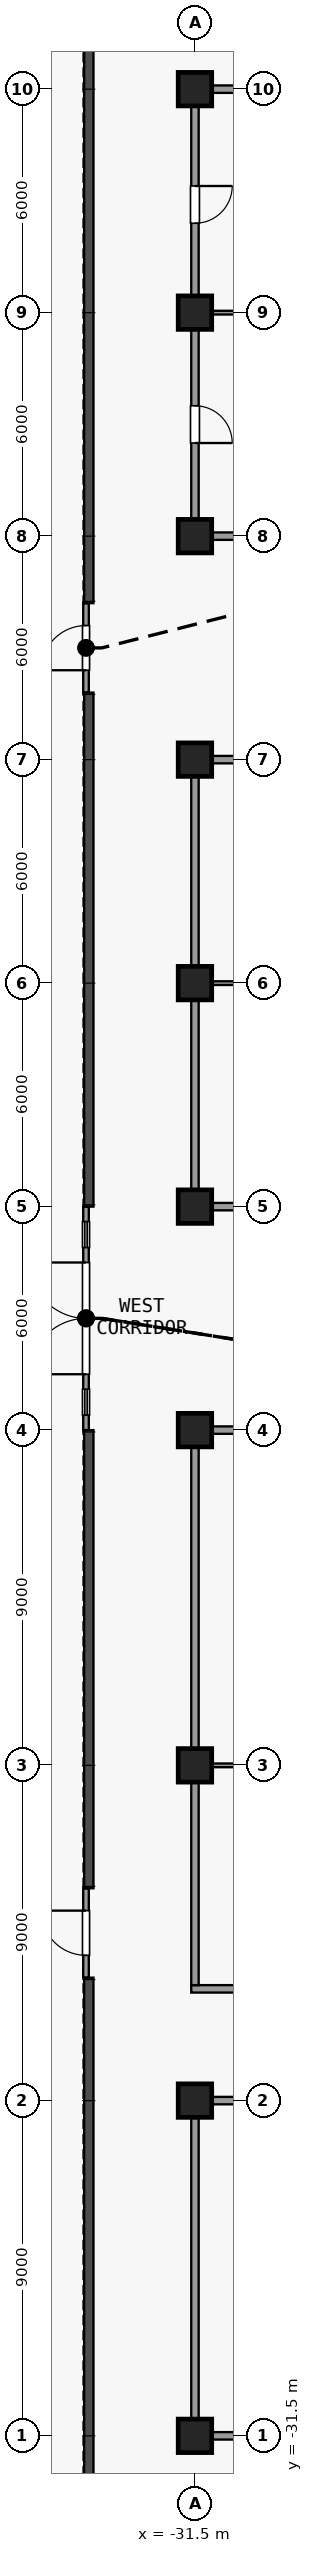
"""IFC4 building model, lengths in metres.
Left out: names, types, materials, properties, quantities, classifications, styles, units other than length and angle.
Written with IfcOpenShell. Run it as: python <this file> out.ifc"""

import sys

from ifc_helpers import new_model, si_unit, direction, frame, frame_2d, origin, origin_2d, place, context, subcontext, project, spatial, rectangle, extrude, element, fill, save


model = new_model("IFC4")
c1 = context("Model", 3, precision=1e-05, world=origin(), true_north=direction((0.0, 1.0)))
c2 = subcontext(c1, "Body", "Model", "MODEL_VIEW")
j1 = project(units=[si_unit("LENGTHUNIT", "METRE"), si_unit("PLANEANGLEUNIT", "RADIAN")], contexts=[c1])
p1 = place(None, origin())
s1 = spatial("IfcSite", under=j1, at=p1, CompositionType="ELEMENT")
p2 = place(p1, origin())
s2 = spatial("IfcBuilding", under=s1, at=p2, CompositionType="ELEMENT")
p3 = place(p2, origin())
s3 = spatial("IfcBuildingStorey", under=s2, at=p3, CompositionType="ELEMENT", Elevation=0.0)
for number, where, z_axis, x_axis in (
    (1, (-31.5, -31.5, 0.0), (0.0, 0.0, 1.0), (1.0, 0.0, 0.0)),
    (2, (-31.5, -22.5, 0.0), (0.0, 0.0, 1.0), (1.0, 0.0, 0.0)),
    (3, (-31.5, -13.5, 0.0), (0.0, 0.0, 1.0), (1.0, 0.0, 0.0)),
    (4, (-31.5, -4.5, 0.0), (0.0, 0.0, 1.0), (1.0, 0.0, 0.0)),
    (5, (-31.5, 1.5, 0.0), (0.0, 0.0, 1.0), (1.0, 0.0, 0.0)),
    (6, (-31.5, 7.5, 0.0), (0.0, 0.0, 1.0), (1.0, 0.0, 0.0)),
    (7, (-31.5, 13.5, 0.0), (0.0, 0.0, 1.0), (1.0, 0.0, 0.0)),
    (8, (-31.5, 19.5, 0.0), (0.0, 0.0, 1.0), (1.0, 0.0, 0.0)),
    (9, (-31.5, 25.5, 0.0), (0.0, 0.0, 1.0), (1.0, 0.0, 0.0)),
    (10, (-31.5, 31.5, 0.0), (0.0, 0.0, 1.0), (1.0, 0.0, 0.0)),
):
    element("IfcColumn", number, at=place(p3, frame(where, z_axis=z_axis, x_axis=x_axis)), inside=s3, PredefinedType="COLUMN", context=c2, shape_type="SweptSolid", body=[
        extrude(rectangle(XDim=0.9, YDim=0.9, at=origin_2d()), origin(), (0.0, 0.0, 1.0), 8.0),
    ])
p4 = place(p3, frame((-34.425, -4.5, 0.0), z_axis=(0.0, 0.0, 1.0), x_axis=(0.0, 1.0, 0.0)))
e11 = element("IfcWall", 11, at=p4, inside=s3, PredefinedType="SOLIDWALL", context=c2, shape_type="SweptSolid", body=[
    extrude(rectangle(XDim=6.0, YDim=0.15, at=frame_2d((3.0, 0.0))), origin(), (0.0, 0.0, 1.0), 7.65),
])
p5 = place(p4, frame((1.5, 0.0, 0.0)))
e12 = element("IfcOpeningElement", 12, at=p5, cuts=e11, PredefinedType="OPENING", context=c2, shape_type="SweptSolid", body=[
    extrude(rectangle(XDim=3.0, YDim=3.6, at=frame_2d((1.5, 1.8))), frame((0.0, 0.085, 0.0), z_axis=(0.0, -1.0, 0.0), x_axis=(1.0, 0.0, 0.0)), (0.0, 0.0, 1.0), 0.17),
])
p6 = place(p4, frame((0.4, 0.0, 0.0)))
e13 = element("IfcOpeningElement", 13, at=p6, cuts=e11, PredefinedType="OPENING", context=c2, shape_type="SweptSolid", body=[
    extrude(rectangle(XDim=0.7, YDim=5.0, at=frame_2d((0.35, 2.5))), frame((0.0, 0.085, 0.0), z_axis=(0.0, -1.0, 0.0), x_axis=(1.0, 0.0, 0.0)), (0.0, 0.0, 1.0), 0.17),
])
p7 = place(p4, frame((4.9, 0.0, 0.0)))
e14 = element("IfcOpeningElement", 14, at=p7, cuts=e11, PredefinedType="OPENING", context=c2, shape_type="SweptSolid", body=[
    extrude(rectangle(XDim=0.7, YDim=5.0, at=frame_2d((0.35, 2.5))), frame((0.0, 0.085, 0.0), z_axis=(0.0, -1.0, 0.0), x_axis=(1.0, 0.0, 0.0)), (0.0, 0.0, 1.0), 0.17),
])
p8 = place(p3, frame((-34.425, 15.3, 0.0), z_axis=(0.0, 0.0, 1.0), x_axis=(0.0, 1.0, 0.0)))
e15 = element("IfcWall", 15, at=p8, inside=s3, PredefinedType="SOLIDWALL", context=c2, shape_type="SweptSolid", body=[
    extrude(rectangle(XDim=2.4, YDim=0.15, at=frame_2d((1.2, 0.0))), origin(), (0.0, 0.0, 1.0), 7.65),
])
p9 = place(p8, frame((0.6, 0.0, 0.0)))
e16 = element("IfcOpeningElement", 16, at=p9, cuts=e15, PredefinedType="OPENING", context=c2, shape_type="SweptSolid", body=[
    extrude(rectangle(XDim=1.2, YDim=2.4, at=frame_2d((0.6, 1.2))), frame((0.0, 0.085, 0.0), z_axis=(0.0, -1.0, 0.0), x_axis=(1.0, 0.0, 0.0)), (0.0, 0.0, 1.0), 0.17),
])
p10 = place(p3, frame((-34.425, -19.2, 0.0), z_axis=(0.0, 0.0, 1.0), x_axis=(0.0, 1.0, 0.0)))
e17 = element("IfcWall", 17, at=p10, inside=s3, PredefinedType="SOLIDWALL", context=c2, shape_type="SweptSolid", body=[
    extrude(rectangle(XDim=2.4, YDim=0.15, at=frame_2d((1.2, 0.0))), origin(), (0.0, 0.0, 1.0), 7.65),
])
p11 = place(p10, frame((0.6, 0.0, 0.0)))
e18 = element("IfcOpeningElement", 18, at=p11, cuts=e17, PredefinedType="OPENING", context=c2, shape_type="SweptSolid", body=[
    extrude(rectangle(XDim=1.2, YDim=2.4, at=frame_2d((0.6, 1.2))), frame((0.0, 0.085, 0.0), z_axis=(0.0, -1.0, 0.0), x_axis=(1.0, 0.0, 0.0)), (0.0, 0.0, 1.0), 0.17),
])
p12 = place(p3, frame((-31.6, -31.5, 0.0), z_axis=(0.0, 0.0, 1.0), x_axis=(1.0, 0.0, 0.0)))
e19 = element("IfcWall", 19, at=p12, inside=s3, PredefinedType="PARTITIONING", context=c2, shape_type="SweptSolid", body=[
    extrude(rectangle(XDim=2.35, YDim=0.2, at=frame_2d((1.175, 0.0))), origin(), (0.0, 0.0, 1.0), 7.65),
])
p13 = place(p3, frame((-31.6, -22.5, 0.0), z_axis=(0.0, 0.0, 1.0), x_axis=(1.0, 0.0, 0.0)))
e20 = element("IfcWall", 20, at=p13, inside=s3, PredefinedType="PARTITIONING", context=c2, shape_type="SweptSolid", body=[
    extrude(rectangle(XDim=14.2, YDim=0.2, at=frame_2d((7.1, 0.0))), origin(), (0.0, 0.0, 1.0), 7.65),
])
p14 = place(p13, frame((2.4, 0.0, 0.0)))
e21 = element("IfcOpeningElement", 21, at=p14, cuts=e20, PredefinedType="OPENING", context=c2, shape_type="SweptSolid", body=[
    extrude(rectangle(XDim=1.0, YDim=2.1, at=frame_2d((0.5, 1.05))), frame((0.0, 0.11, 0.0), z_axis=(0.0, -1.0, 0.0), x_axis=(1.0, 0.0, 0.0)), (0.0, 0.0, 1.0), 0.22),
])
p15 = place(p13, frame((10.8, 0.0, 0.0)))
e22 = element("IfcOpeningElement", 22, at=p15, cuts=e20, PredefinedType="OPENING", context=c2, shape_type="SweptSolid", body=[
    extrude(rectangle(XDim=1.0, YDim=2.1, at=frame_2d((0.5, 1.05))), frame((0.0, 0.11, 0.0), z_axis=(0.0, -1.0, 0.0), x_axis=(1.0, 0.0, 0.0)), (0.0, 0.0, 1.0), 0.22),
])
p16 = place(p3, frame((-31.6, -19.5, 0.0), z_axis=(0.0, 0.0, 1.0), x_axis=(1.0, 0.0, 0.0)))
e23 = element("IfcWall", 23, at=p16, inside=s3, PredefinedType="PARTITIONING", context=c2, shape_type="SweptSolid", body=[
    extrude(rectangle(XDim=18.1, YDim=0.2, at=frame_2d((9.05, 0.0))), origin(), (0.0, 0.0, 1.0), 7.65),
])
p17 = place(p16, frame((3.2, 0.0, 0.0)))
e24 = element("IfcOpeningElement", 24, at=p17, cuts=e23, PredefinedType="OPENING", context=c2, shape_type="SweptSolid", body=[
    extrude(rectangle(XDim=1.0, YDim=2.1, at=frame_2d((0.5, 1.05))), frame((0.0, 0.11, 0.0), z_axis=(0.0, -1.0, 0.0), x_axis=(1.0, 0.0, 0.0)), (0.0, 0.0, 1.0), 0.22),
])
p18 = place(p16, frame((14.0, 0.0, 0.0)))
e25 = element("IfcOpeningElement", 25, at=p18, cuts=e23, PredefinedType="OPENING", context=c2, shape_type="SweptSolid", body=[
    extrude(rectangle(XDim=1.0, YDim=2.1, at=frame_2d((0.5, 1.05))), frame((0.0, 0.11, 0.0), z_axis=(0.0, -1.0, 0.0), x_axis=(1.0, 0.0, 0.0)), (0.0, 0.0, 1.0), 0.22),
])
p19 = place(p3, frame((-31.4, -13.5, 0.0), z_axis=(0.0, 0.0, 1.0), x_axis=(1.0, 0.0, 0.0)))
e26 = element("IfcWall", 26, at=p19, inside=s3, PredefinedType="PARTITIONING", context=c2, shape_type="SweptSolid", body=[
    extrude(rectangle(XDim=17.9, YDim=0.1, at=frame_2d((8.95, 0.0))), origin(), (0.0, 0.0, 1.0), 7.65),
])
p20 = place(p3, frame((-31.6, -4.5, 0.0), z_axis=(0.0, 0.0, 1.0), x_axis=(1.0, 0.0, 0.0)))
e27 = element("IfcWall", 27, at=p20, inside=s3, PredefinedType="PARTITIONING", context=c2, shape_type="SweptSolid", body=[
    extrude(rectangle(XDim=18.2, YDim=0.2, at=frame_2d((9.1, 0.0))), origin(), (0.0, 0.0, 1.0), 7.65),
])
p21 = place(p20, frame((3.2, 0.0, 0.0)))
e28 = element("IfcOpeningElement", 28, at=p21, cuts=e27, PredefinedType="OPENING", context=c2, shape_type="SweptSolid", body=[
    extrude(rectangle(XDim=1.0, YDim=2.1, at=frame_2d((0.5, 1.05))), frame((0.0, 0.11, 0.0), z_axis=(0.0, -1.0, 0.0), x_axis=(1.0, 0.0, 0.0)), (0.0, 0.0, 1.0), 0.22),
])
p22 = place(p20, frame((13.2, 0.0, 0.0)))
e29 = element("IfcOpeningElement", 29, at=p22, cuts=e27, PredefinedType="OPENING", context=c2, shape_type="SweptSolid", body=[
    extrude(rectangle(XDim=1.0, YDim=2.1, at=frame_2d((0.5, 1.05))), frame((0.0, 0.11, 0.0), z_axis=(0.0, -1.0, 0.0), x_axis=(1.0, 0.0, 0.0)), (0.0, 0.0, 1.0), 0.22),
])
p23 = place(p3, frame((-31.6, 1.5, 0.0), z_axis=(0.0, 0.0, 1.0), x_axis=(1.0, 0.0, 0.0)))
e30 = element("IfcWall", 30, at=p23, inside=s3, PredefinedType="PARTITIONING", context=c2, shape_type="SweptSolid", body=[
    extrude(rectangle(XDim=36.1, YDim=0.2, at=frame_2d((18.05, 0.0))), origin(), (0.0, 0.0, 1.0), 7.65),
])
p24 = place(p23, frame((3.2, 0.0, 0.0)))
e31 = element("IfcOpeningElement", 31, at=p24, cuts=e30, PredefinedType="OPENING", context=c2, shape_type="SweptSolid", body=[
    extrude(rectangle(XDim=1.0, YDim=2.1, at=frame_2d((0.5, 1.05))), frame((0.0, 0.11, 0.0), z_axis=(0.0, -1.0, 0.0), x_axis=(1.0, 0.0, 0.0)), (0.0, 0.0, 1.0), 0.22),
])
p25 = place(p23, frame((13.2, 0.0, 0.0)))
e32 = element("IfcOpeningElement", 32, at=p25, cuts=e30, PredefinedType="OPENING", context=c2, shape_type="SweptSolid", body=[
    extrude(rectangle(XDim=1.0, YDim=2.1, at=frame_2d((0.5, 1.05))), frame((0.0, 0.11, 0.0), z_axis=(0.0, -1.0, 0.0), x_axis=(1.0, 0.0, 0.0)), (0.0, 0.0, 1.0), 0.22),
])
p26 = place(p3, frame((-31.4, 7.5, 0.0), z_axis=(0.0, 0.0, 1.0), x_axis=(1.0, 0.0, 0.0)))
e33 = element("IfcWall", 33, at=p26, inside=s3, PredefinedType="PARTITIONING", context=c2, shape_type="SweptSolid", body=[
    extrude(rectangle(XDim=35.9, YDim=0.1, at=frame_2d((17.95, 0.0))), origin(), (0.0, 0.0, 1.0), 7.65),
])
p27 = place(p3, frame((-31.6, 13.5, 0.0), z_axis=(0.0, 0.0, 1.0), x_axis=(1.0, 0.0, 0.0)))
e34 = element("IfcWall", 34, at=p27, inside=s3, PredefinedType="PARTITIONING", context=c2, shape_type="SweptSolid", body=[
    extrude(rectangle(XDim=54.75, YDim=0.2, at=frame_2d((27.375, 0.0))), origin(), (0.0, 0.0, 1.0), 7.65),
])
p28 = place(p27, frame((7.2, 0.0, 0.0)))
e35 = element("IfcOpeningElement", 35, at=p28, cuts=e34, PredefinedType="OPENING", context=c2, shape_type="SweptSolid", body=[
    extrude(rectangle(XDim=1.0, YDim=2.1, at=frame_2d((0.5, 1.05))), frame((0.0, 0.11, 0.0), z_axis=(0.0, -1.0, 0.0), x_axis=(1.0, 0.0, 0.0)), (0.0, 0.0, 1.0), 0.22),
])
p29 = place(p27, frame((34.2, 0.0, 0.0)))
e36 = element("IfcOpeningElement", 36, at=p29, cuts=e34, PredefinedType="OPENING", context=c2, shape_type="SweptSolid", body=[
    extrude(rectangle(XDim=1.0, YDim=2.1, at=frame_2d((0.5, 1.05))), frame((0.0, 0.11, 0.0), z_axis=(0.0, -1.0, 0.0), x_axis=(1.0, 0.0, 0.0)), (0.0, 0.0, 1.0), 0.22),
])
p30 = place(p27, frame((45.3, 0.0, 0.0)))
e37 = element("IfcOpeningElement", 37, at=p30, cuts=e34, PredefinedType="OPENING", context=c2, shape_type="SweptSolid", body=[
    extrude(rectangle(XDim=1.0, YDim=2.1, at=frame_2d((0.5, 1.05))), frame((0.0, 0.11, 0.0), z_axis=(0.0, -1.0, 0.0), x_axis=(1.0, 0.0, 0.0)), (0.0, 0.0, 1.0), 0.22),
])
p31 = place(p27, frame((52.0, 0.0, 0.0)))
e38 = element("IfcOpeningElement", 38, at=p31, cuts=e34, PredefinedType="OPENING", context=c2, shape_type="SweptSolid", body=[
    extrude(rectangle(XDim=1.0, YDim=2.1, at=frame_2d((0.5, 1.05))), frame((0.0, 0.11, 0.0), z_axis=(0.0, -1.0, 0.0), x_axis=(1.0, 0.0, 0.0)), (0.0, 0.0, 1.0), 0.22),
])
p32 = place(p3, frame((-31.6, 19.5, 0.0), z_axis=(0.0, 0.0, 1.0), x_axis=(1.0, 0.0, 0.0)))
e39 = element("IfcWall", 39, at=p32, inside=s3, PredefinedType="PARTITIONING", context=c2, shape_type="SweptSolid", body=[
    extrude(rectangle(XDim=54.75, YDim=0.2, at=frame_2d((27.375, 0.0))), origin(), (0.0, 0.0, 1.0), 7.65),
])
p33 = place(p32, frame((7.2, 0.0, 0.0)))
e40 = element("IfcOpeningElement", 40, at=p33, cuts=e39, PredefinedType="OPENING", context=c2, shape_type="SweptSolid", body=[
    extrude(rectangle(XDim=1.0, YDim=2.1, at=frame_2d((0.5, 1.05))), frame((0.0, 0.11, 0.0), z_axis=(0.0, -1.0, 0.0), x_axis=(1.0, 0.0, 0.0)), (0.0, 0.0, 1.0), 0.22),
])
p34 = place(p32, frame((16.0, 0.0, 0.0)))
e41 = element("IfcOpeningElement", 41, at=p34, cuts=e39, PredefinedType="OPENING", context=c2, shape_type="SweptSolid", body=[
    extrude(rectangle(XDim=1.0, YDim=2.1, at=frame_2d((0.5, 1.05))), frame((0.0, 0.11, 0.0), z_axis=(0.0, -1.0, 0.0), x_axis=(1.0, 0.0, 0.0)), (0.0, 0.0, 1.0), 0.22),
])
p35 = place(p32, frame((32.5, 0.0, 0.0)))
e42 = element("IfcOpeningElement", 42, at=p35, cuts=e39, PredefinedType="OPENING", context=c2, shape_type="SweptSolid", body=[
    extrude(rectangle(XDim=1.0, YDim=2.1, at=frame_2d((0.5, 1.05))), frame((0.0, 0.11, 0.0), z_axis=(0.0, -1.0, 0.0), x_axis=(1.0, 0.0, 0.0)), (0.0, 0.0, 1.0), 0.22),
])
p36 = place(p32, frame((46.2, 0.0, 0.0)))
e43 = element("IfcOpeningElement", 43, at=p36, cuts=e39, PredefinedType="OPENING", context=c2, shape_type="SweptSolid", body=[
    extrude(rectangle(XDim=1.0, YDim=2.1, at=frame_2d((0.5, 1.05))), frame((0.0, 0.11, 0.0), z_axis=(0.0, -1.0, 0.0), x_axis=(1.0, 0.0, 0.0)), (0.0, 0.0, 1.0), 0.22),
])
p37 = place(p3, frame((-31.4, 25.5, 0.0), z_axis=(0.0, 0.0, 1.0), x_axis=(1.0, 0.0, 0.0)))
e44 = element("IfcWall", 44, at=p37, inside=s3, PredefinedType="PARTITIONING", context=c2, shape_type="SweptSolid", body=[
    extrude(rectangle(XDim=2.15, YDim=0.1, at=frame_2d((1.075, 0.0))), origin(), (0.0, 0.0, 1.0), 7.65),
])
p38 = place(p3, frame((-31.6, 31.5, 0.0), z_axis=(0.0, 0.0, 1.0), x_axis=(1.0, 0.0, 0.0)))
e45 = element("IfcWall", 45, at=p38, inside=s3, PredefinedType="PARTITIONING", context=c2, shape_type="SweptSolid", body=[
    extrude(rectangle(XDim=2.35, YDim=0.2, at=frame_2d((1.175, 0.0))), origin(), (0.0, 0.0, 1.0), 7.65),
])
p39 = place(p3, frame((-31.5, -31.4, 0.0), z_axis=(0.0, 0.0, 1.0), x_axis=(0.0, 1.0, 0.0)))
e46 = element("IfcWall", 46, at=p39, inside=s3, PredefinedType="PARTITIONING", context=c2, shape_type="SweptSolid", body=[
    extrude(rectangle(XDim=8.8, YDim=0.2, at=frame_2d((4.4, 0.0))), origin(), (0.0, 0.0, 1.0), 7.65),
])
p40 = place(p3, frame((-31.5, -19.4, 0.0), z_axis=(0.0, 0.0, 1.0), x_axis=(0.0, 1.0, 0.0)))
e47 = element("IfcWall", 47, at=p40, inside=s3, PredefinedType="PARTITIONING", context=c2, shape_type="SweptSolid", body=[
    extrude(rectangle(XDim=14.8, YDim=0.2, at=frame_2d((7.4, 0.0))), origin(), (0.0, 0.0, 1.0), 7.65),
])
p41 = place(p3, frame((-31.5, 1.6, 0.0), z_axis=(0.0, 0.0, 1.0), x_axis=(0.0, 1.0, 0.0)))
e48 = element("IfcWall", 48, at=p41, inside=s3, PredefinedType="PARTITIONING", context=c2, shape_type="SweptSolid", body=[
    extrude(rectangle(XDim=11.8, YDim=0.2, at=frame_2d((5.9, 0.0))), origin(), (0.0, 0.0, 1.0), 7.65),
])
p42 = place(p3, frame((-31.5, 19.6, 0.0), z_axis=(0.0, 0.0, 1.0), x_axis=(0.0, 1.0, 0.0)))
e49 = element("IfcWall", 49, at=p42, inside=s3, PredefinedType="PARTITIONING", context=c2, shape_type="SweptSolid", body=[
    extrude(rectangle(XDim=11.8, YDim=0.2, at=frame_2d((5.9, 0.0))), origin(), (0.0, 0.0, 1.0), 7.65),
])
p43 = place(p42, frame((2.4, 0.0, 0.0)))
e50 = element("IfcOpeningElement", 50, at=p43, cuts=e49, PredefinedType="OPENING", context=c2, shape_type="SweptSolid", body=[
    extrude(rectangle(XDim=1.0, YDim=2.1, at=frame_2d((0.5, 1.05))), frame((0.0, 0.11, 0.0), z_axis=(0.0, -1.0, 0.0), x_axis=(1.0, 0.0, 0.0)), (0.0, 0.0, 1.0), 0.22),
])
p44 = place(p42, frame((8.3, 0.0, 0.0)))
e51 = element("IfcOpeningElement", 51, at=p44, cuts=e49, PredefinedType="OPENING", context=c2, shape_type="SweptSolid", body=[
    extrude(rectangle(XDim=1.0, YDim=2.1, at=frame_2d((0.5, 1.05))), frame((0.0, 0.11, 0.0), z_axis=(0.0, -1.0, 0.0), x_axis=(1.0, 0.0, 0.0)), (0.0, 0.0, 1.0), 0.22),
])
p45 = place(p5, origin())
e52 = element("IfcDoor", 52, at=p45, inside=s3, OperationType="DOUBLE_DOOR_SINGLE_SWING", PredefinedType="DOOR", context=c2, shape_type="SweptSolid", body=[
    extrude(rectangle(XDim=3.0, YDim=3.6, at=frame_2d((1.5, 1.8))), frame((0.0, 0.025, 0.0), z_axis=(0.0, -1.0, 0.0), x_axis=(1.0, 0.0, 0.0)), (0.0, 0.0, 1.0), 0.05),
])
fill(e12, e52)
p46 = place(p6, origin())
e53 = element("IfcWindow", 53, at=p46, inside=s3, PartitioningType="SINGLE_PANEL", PredefinedType="WINDOW", context=c2, shape_type="SweptSolid", body=[
    extrude(rectangle(XDim=0.7, YDim=5.0, at=frame_2d((0.35, 2.5))), frame((0.0, 0.03, 0.0), z_axis=(0.0, -1.0, 0.0), x_axis=(1.0, 0.0, 0.0)), (0.0, 0.0, 1.0), 0.06),
])
fill(e13, e53)
p47 = place(p7, origin())
e54 = element("IfcWindow", 54, at=p47, inside=s3, PartitioningType="SINGLE_PANEL", PredefinedType="WINDOW", context=c2, shape_type="SweptSolid", body=[
    extrude(rectangle(XDim=0.7, YDim=5.0, at=frame_2d((0.35, 2.5))), frame((0.0, 0.03, 0.0), z_axis=(0.0, -1.0, 0.0), x_axis=(1.0, 0.0, 0.0)), (0.0, 0.0, 1.0), 0.06),
])
fill(e14, e54)
p48 = place(p9, origin())
e55 = element("IfcDoor", 55, at=p48, inside=s3, OperationType="SINGLE_SWING_LEFT", PredefinedType="DOOR", context=c2, shape_type="SweptSolid", body=[
    extrude(rectangle(XDim=1.2, YDim=2.4, at=frame_2d((0.6, 1.2))), frame((0.0, 0.025, 0.0), z_axis=(0.0, -1.0, 0.0), x_axis=(1.0, 0.0, 0.0)), (0.0, 0.0, 1.0), 0.05),
])
fill(e16, e55)
p49 = place(p11, origin())
e56 = element("IfcDoor", 56, at=p49, inside=s3, OperationType="SINGLE_SWING_RIGHT", PredefinedType="DOOR", context=c2, shape_type="SweptSolid", body=[
    extrude(rectangle(XDim=1.2, YDim=2.4, at=frame_2d((0.6, 1.2))), frame((0.0, 0.025, 0.0), z_axis=(0.0, -1.0, 0.0), x_axis=(1.0, 0.0, 0.0)), (0.0, 0.0, 1.0), 0.05),
])
fill(e18, e56)
p50 = place(p43, origin())
e57 = element("IfcDoor", 57, at=p50, inside=s3, OperationType="SINGLE_SWING_LEFT", PredefinedType="DOOR", context=c2, shape_type="SweptSolid", body=[
    extrude(rectangle(XDim=1.0, YDim=2.1, at=frame_2d((0.5, 1.05))), frame((0.0, 0.025, 0.0), z_axis=(0.0, -1.0, 0.0), x_axis=(1.0, 0.0, 0.0)), (0.0, 0.0, 1.0), 0.05),
])
fill(e50, e57)
p51 = place(p44, origin())
e58 = element("IfcDoor", 58, at=p51, inside=s3, OperationType="SINGLE_SWING_RIGHT", PredefinedType="DOOR", context=c2, shape_type="SweptSolid", body=[
    extrude(rectangle(XDim=1.0, YDim=2.1, at=frame_2d((0.5, 1.05))), frame((0.0, 0.025, 0.0), z_axis=(0.0, -1.0, 0.0), x_axis=(1.0, 0.0, 0.0)), (0.0, 0.0, 1.0), 0.05),
])
fill(e51, e58)
save(model, sys.argv[1])
